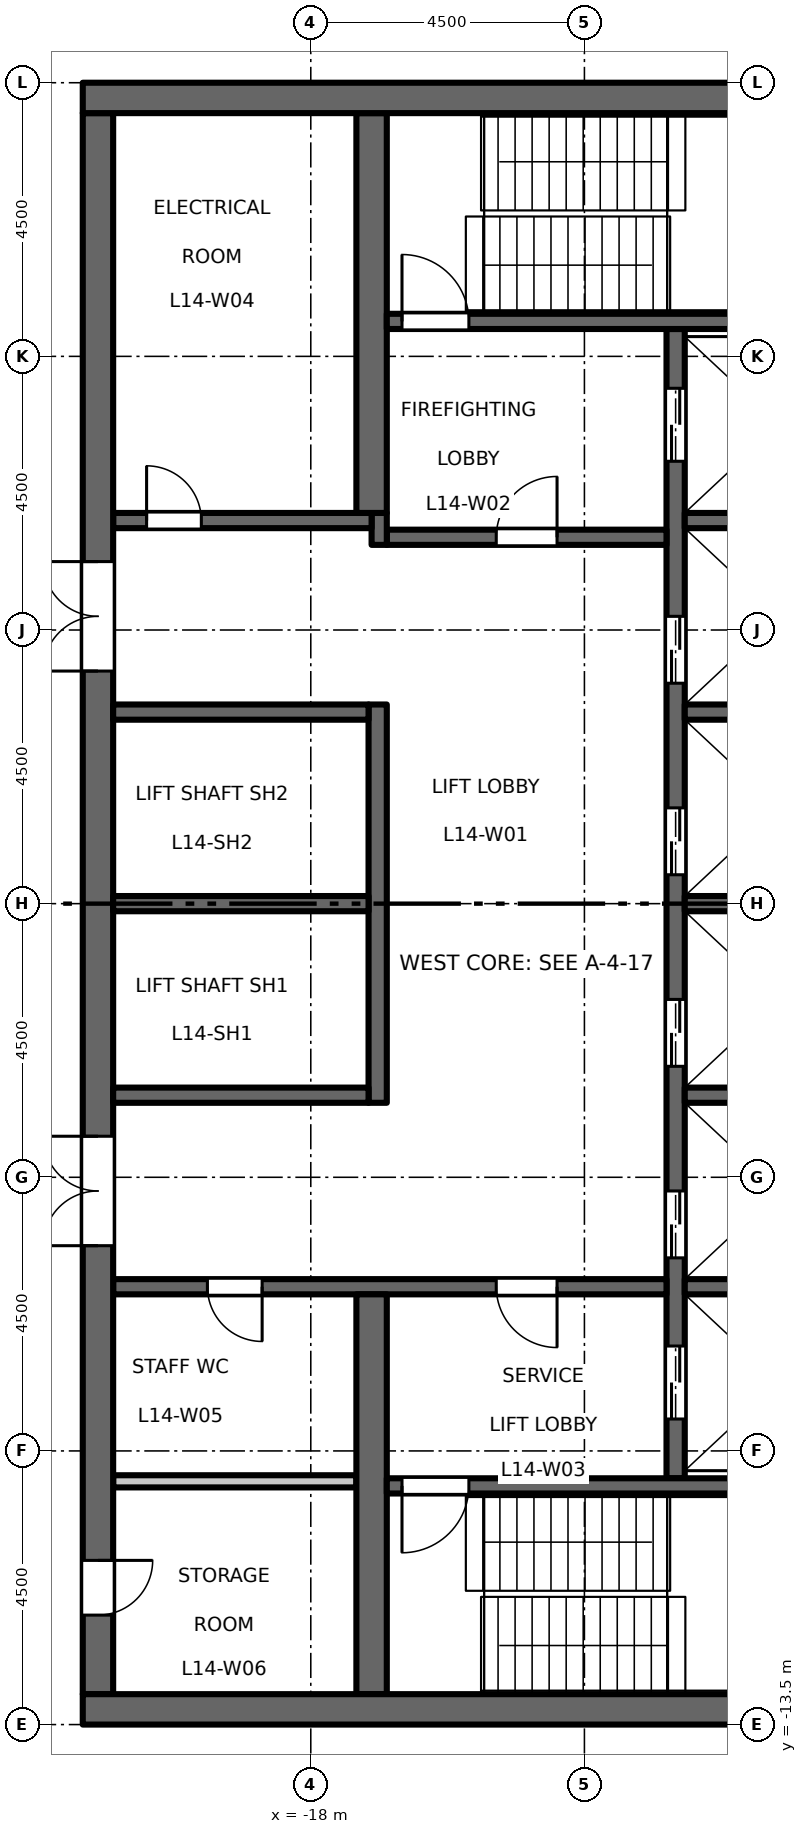
"""IFC4 building model, lengths in metres.
Left out: names, types, materials, properties, quantities, classifications, styles, units other than length and angle.
Written with IfcOpenShell. Run it as: python <this file> out.ifc"""

import sys

from ifc_helpers import new_model, si_unit, direction, frame, frame_2d, origin, place, context, subcontext, project, spatial, rectangle, extrude, element, fill, save


model = new_model("IFC4")
c1 = context("Model", 3, precision=1e-05, world=origin(), true_north=direction((0.0, 1.0)))
c2 = subcontext(c1, "Body", "Model", "MODEL_VIEW")
j1 = project(units=[si_unit("LENGTHUNIT", "METRE"), si_unit("PLANEANGLEUNIT", "RADIAN")], contexts=[c1])
p1 = place(None, origin())
s1 = spatial("IfcSite", under=j1, at=p1, CompositionType="ELEMENT")
p2 = place(p1, origin())
s2 = spatial("IfcBuilding", under=s1, at=p2, CompositionType="ELEMENT")
p3 = place(p2, frame((0.0, 0.0, 67.2)))
s3 = spatial("IfcBuildingStorey", under=s2, at=p3, CompositionType="ELEMENT", Elevation=67.2)
p4 = place(p3, frame((-12.0, -9.45, 0.0), z_axis=(0.0, 0.0, 1.0), x_axis=(0.0, 1.0, 0.0)))
e1 = element("IfcWall", 1, at=p4, inside=s3, PredefinedType="SHEAR", context=c2, shape_type="SweptSolid", body=[
    extrude(rectangle(XDim=18.9, YDim=0.3, at=frame_2d((9.45, 0.0))), origin(), (0.0, 0.0, 1.0), 4.35),
])
p5 = place(p4, frame((3.625, 0.0, 0.0)))
e2 = element("IfcOpeningElement", 2, at=p5, cuts=e1, PredefinedType="OPENING", context=c2, shape_type="SweptSolid", body=[
    extrude(rectangle(XDim=1.1, YDim=2.1, at=frame_2d((0.55, 1.05))), frame((0.0, 0.16, 0.0), z_axis=(0.0, -1.0, 0.0), x_axis=(1.0, 0.0, 0.0)), (0.0, 0.0, 1.0), 0.32),
])
p6 = place(p4, frame((6.775, 0.0, 0.0)))
e3 = element("IfcOpeningElement", 3, at=p6, cuts=e1, PredefinedType="OPENING", context=c2, shape_type="SweptSolid", body=[
    extrude(rectangle(XDim=1.1, YDim=2.1, at=frame_2d((0.55, 1.05))), frame((0.0, 0.16, 0.0), z_axis=(0.0, -1.0, 0.0), x_axis=(1.0, 0.0, 0.0)), (0.0, 0.0, 1.0), 0.32),
])
p7 = place(p4, frame((9.925, 0.0, 0.0)))
e4 = element("IfcOpeningElement", 4, at=p7, cuts=e1, PredefinedType="OPENING", context=c2, shape_type="SweptSolid", body=[
    extrude(rectangle(XDim=1.1, YDim=2.1, at=frame_2d((0.55, 1.05))), frame((0.0, 0.16, 0.0), z_axis=(0.0, -1.0, 0.0), x_axis=(1.0, 0.0, 0.0)), (0.0, 0.0, 1.0), 0.32),
])
p8 = place(p4, frame((13.075, 0.0, 0.0)))
e5 = element("IfcOpeningElement", 5, at=p8, cuts=e1, PredefinedType="OPENING", context=c2, shape_type="SweptSolid", body=[
    extrude(rectangle(XDim=1.1, YDim=2.1, at=frame_2d((0.55, 1.05))), frame((0.0, 0.16, 0.0), z_axis=(0.0, -1.0, 0.0), x_axis=(1.0, 0.0, 0.0)), (0.0, 0.0, 1.0), 0.32),
])
p9 = place(p4, frame((16.725, 0.0, 0.0)))
e6 = element("IfcOpeningElement", 6, at=p9, cuts=e1, PredefinedType="OPENING", context=c2, shape_type="SweptSolid", body=[
    extrude(rectangle(XDim=1.2, YDim=2.1, at=frame_2d((0.6, 1.05))), frame((0.0, 0.16, 0.0), z_axis=(0.0, -1.0, 0.0), x_axis=(1.0, 0.0, 0.0)), (0.0, 0.0, 1.0), 0.32),
])
p10 = place(p4, frame((0.975, 0.0, 0.0)))
e7 = element("IfcOpeningElement", 7, at=p10, cuts=e1, PredefinedType="OPENING", context=c2, shape_type="SweptSolid", body=[
    extrude(rectangle(XDim=1.2, YDim=2.1, at=frame_2d((0.6, 1.05))), frame((0.0, 0.16, 0.0), z_axis=(0.0, -1.0, 0.0), x_axis=(1.0, 0.0, 0.0)), (0.0, 0.0, 1.0), 0.32),
])
p11 = place(p3, frame((-12.15, 6.025, 0.0), z_axis=(0.0, 0.0, 1.0), x_axis=(-1.0, 0.0, 0.0)))
e8 = element("IfcWall", 8, at=p11, inside=s3, PredefinedType="SHEAR", context=c2, shape_type="SweptSolid", body=[
    extrude(rectangle(XDim=4.6, YDim=0.25, at=frame_2d((2.3, 0.0))), origin(), (0.0, 0.0, 1.0), 4.35),
])
p12 = place(p11, frame((1.8, 0.0, 0.0)))
e9 = element("IfcOpeningElement", 9, at=p12, cuts=e8, PredefinedType="OPENING", context=c2, shape_type="SweptSolid", body=[
    extrude(rectangle(XDim=1.0, YDim=2.1, at=frame_2d((0.5, 1.05))), frame((0.0, 0.135, 0.0), z_axis=(0.0, -1.0, 0.0), x_axis=(1.0, 0.0, 0.0)), (0.0, 0.0, 1.0), 0.27),
])
p13 = place(p3, frame((-16.875, 5.9, 0.0), z_axis=(0.0, 0.0, 1.0), x_axis=(0.0, 1.0, 0.0)))
e10 = element("IfcWall", 10, at=p13, inside=s3, PredefinedType="SHEAR", context=c2, shape_type="SweptSolid", body=[
    extrude(rectangle(XDim=0.525, YDim=0.25, at=frame_2d((0.263, 0.0))), origin(), (0.0, 0.0, 1.0), 4.35),
])
p14 = place(p3, frame((-17.0, 6.3, 0.0), z_axis=(0.0, 0.0, 1.0), x_axis=(-1.0, 0.0, 0.0)))
e11 = element("IfcWall", 11, at=p14, inside=s3, PredefinedType="SHEAR", context=c2, shape_type="SweptSolid", body=[
    extrude(rectangle(XDim=4.25, YDim=0.25, at=frame_2d((2.125, 0.0))), origin(), (0.0, 0.0, 1.0), 4.35),
])
p15 = place(p14, frame((2.8, 0.0, 0.0)))
e12 = element("IfcOpeningElement", 12, at=p15, cuts=e11, PredefinedType="OPENING", context=c2, shape_type="SweptSolid", body=[
    extrude(rectangle(XDim=0.9, YDim=2.1, at=frame_2d((0.45, 1.05))), frame((0.0, 0.135, 0.0), z_axis=(0.0, -1.0, 0.0), x_axis=(1.0, 0.0, 0.0)), (0.0, 0.0, 1.0), 0.27),
])
p16 = place(p3, frame((-12.15, -6.3, 0.0), z_axis=(0.0, 0.0, 1.0), x_axis=(-1.0, 0.0, 0.0)))
e13 = element("IfcWall", 13, at=p16, inside=s3, PredefinedType="SHEAR", context=c2, shape_type="SweptSolid", body=[
    extrude(rectangle(XDim=9.1, YDim=0.25, at=frame_2d((4.55, 0.0))), origin(), (0.0, 0.0, 1.0), 4.35),
])
p17 = place(p16, frame((1.8, 0.0, 0.0)))
e14 = element("IfcOpeningElement", 14, at=p17, cuts=e13, PredefinedType="OPENING", context=c2, shape_type="SweptSolid", body=[
    extrude(rectangle(XDim=1.0, YDim=2.1, at=frame_2d((0.5, 1.05))), frame((0.0, 0.135, 0.0), z_axis=(0.0, -1.0, 0.0), x_axis=(1.0, 0.0, 0.0)), (0.0, 0.0, 1.0), 0.27),
])
p18 = place(p16, frame((6.65, 0.0, 0.0)))
e15 = element("IfcOpeningElement", 15, at=p18, cuts=e13, PredefinedType="OPENING", context=c2, shape_type="SweptSolid", body=[
    extrude(rectangle(XDim=0.9, YDim=2.1, at=frame_2d((0.45, 1.05))), frame((0.0, 0.135, 0.0), z_axis=(0.0, -1.0, 0.0), x_axis=(1.0, 0.0, 0.0)), (0.0, 0.0, 1.0), 0.27),
])
p19 = place(p3, frame((-21.5, -13.0, 0.0), z_axis=(0.0, 0.0, 1.0), x_axis=(0.0, 1.0, 0.0)))
e16 = element("IfcWall", 16, at=p19, inside=s3, PredefinedType="SHEAR", context=c2, shape_type="SweptSolid", body=[
    extrude(rectangle(XDim=26.0, YDim=0.5, at=frame_2d((13.0, 0.0))), origin(), (0.0, 0.0, 1.0), 4.35),
])
p20 = place(p19, frame((16.825, 0.0, 0.0)))
e17 = element("IfcOpeningElement", 17, at=p20, cuts=e16, PredefinedType="OPENING", context=c2, shape_type="SweptSolid", body=[
    extrude(rectangle(XDim=1.8, YDim=2.1, at=frame_2d((0.9, 1.05))), frame((0.0, 0.26, 0.0), z_axis=(0.0, -1.0, 0.0), x_axis=(1.0, 0.0, 0.0)), (0.0, 0.0, 1.0), 0.52),
])
p21 = place(p19, frame((7.375, 0.0, 0.0)))
e18 = element("IfcOpeningElement", 18, at=p21, cuts=e16, PredefinedType="OPENING", context=c2, shape_type="SweptSolid", body=[
    extrude(rectangle(XDim=1.8, YDim=2.1, at=frame_2d((0.9, 1.05))), frame((0.0, 0.26, 0.0), z_axis=(0.0, -1.0, 0.0), x_axis=(1.0, 0.0, 0.0)), (0.0, 0.0, 1.0), 0.52),
])
p22 = place(p19, frame((1.3, 0.0, 0.0)))
e19 = element("IfcOpeningElement", 19, at=p22, cuts=e16, PredefinedType="OPENING", context=c2, shape_type="SweptSolid", body=[
    extrude(rectangle(XDim=0.9, YDim=2.1, at=frame_2d((0.45, 1.05))), frame((0.0, 0.26, 0.0), z_axis=(0.0, -1.0, 0.0), x_axis=(1.0, 0.0, 0.0)), (0.0, 0.0, 1.0), 0.52),
])
p23 = place(p3, frame((-17.25, -9.5, 0.0), z_axis=(0.0, 0.0, 1.0), x_axis=(-1.0, 0.0, 0.0)))
e20 = element("IfcWall", 20, at=p23, inside=s3, PredefinedType="PARTITIONING", context=c2, shape_type="SweptSolid", body=[
    extrude(rectangle(XDim=4.0, YDim=0.2, at=frame_2d((2.0, 0.0))), origin(), (0.0, 0.0, 1.0), 4.35),
])
p24 = place(p3, frame((-16.9, -3.275, 0.0), z_axis=(0.0, 0.0, 1.0), x_axis=(0.0, 1.0, 0.0)))
e21 = element("IfcWall", 21, at=p24, inside=s3, PredefinedType="SHEAR", context=c2, shape_type="SweptSolid", body=[
    extrude(rectangle(XDim=6.55, YDim=0.3, at=frame_2d((3.275, 0.0))), origin(), (0.0, 0.0, 1.0), 4.35),
])
for number, where, z_axis, x_axis in (
    (22, (-17.05, 0.0, 0.0), (0.0, 0.0, 1.0), (-1.0, 0.0, 0.0)),
    (23, (-17.05, 3.15, 0.0), (0.0, 0.0, 1.0), (-1.0, 0.0, 0.0)),
    (24, (-17.05, -3.15, 0.0), (0.0, 0.0, 1.0), (-1.0, 0.0, 0.0)),
):
    element("IfcWall", number, at=place(p3, frame(where, z_axis=z_axis, x_axis=x_axis)), inside=s3, PredefinedType="SHEAR", context=c2, shape_type="SweptSolid", body=[
        extrude(rectangle(XDim=4.2, YDim=0.25, at=frame_2d((2.1, 0.0))), origin(), (0.0, 0.0, 1.0), 4.35),
    ])
for number, where, z_axis, x_axis in (
    (25, (-17.0, 6.425, 0.0), (0.0, 0.0, 1.0), (0.0, 1.0, 0.0)),
    (26, (-17.0, -13.0, 0.0), (0.0, 0.0, 1.0), (0.0, 1.0, 0.0)),
):
    element("IfcWall", number, at=place(p3, frame(where, z_axis=z_axis, x_axis=x_axis)), inside=s3, PredefinedType="SHEAR", context=c2, shape_type="SweptSolid", body=[
        extrude(rectangle(XDim=6.575, YDim=0.5, at=frame_2d((3.288, 0.0))), origin(), (0.0, 0.0, 1.0), 4.35),
    ])
for number, where, z_axis, x_axis in (
    (27, (-8.75, 0.0, 0.0), (0.0, 0.0, 1.0), (-1.0, 0.0, 0.0)),
    (28, (-8.75, 3.15, 0.0), (0.0, 0.0, 1.0), (-1.0, 0.0, 0.0)),
    (29, (-8.75, 6.3, 0.0), (0.0, 0.0, 1.0), (-1.0, 0.0, 0.0)),
    (30, (-8.75, -3.15, 0.0), (0.0, 0.0, 1.0), (-1.0, 0.0, 0.0)),
    (31, (-8.75, -6.3, 0.0), (0.0, 0.0, 1.0), (-1.0, 0.0, 0.0)),
):
    element("IfcWall", number, at=place(p3, frame(where, z_axis=z_axis, x_axis=x_axis)), inside=s3, PredefinedType="SHEAR", context=c2, shape_type="SweptSolid", body=[
        extrude(rectangle(XDim=3.1, YDim=0.25, at=frame_2d((1.55, 0.0))), origin(), (0.0, 0.0, 1.0), 4.35),
    ])
p25 = place(p3, frame((-8.75, 9.575, 0.0), z_axis=(0.0, 0.0, 1.0), x_axis=(-1.0, 0.0, 0.0)))
e32 = element("IfcWall", 32, at=p25, inside=s3, PredefinedType="SHEAR", context=c2, shape_type="SweptSolid", body=[
    extrude(rectangle(XDim=8.0, YDim=0.25, at=frame_2d((4.0, 0.0))), origin(), (0.0, 0.0, 1.0), 4.35),
])
p26 = place(p25, frame((6.65, 0.0, 0.0)))
e33 = element("IfcOpeningElement", 33, at=p26, cuts=e32, PredefinedType="OPENING", context=c2, shape_type="SweptSolid", body=[
    extrude(rectangle(XDim=1.1, YDim=2.1, at=frame_2d((0.55, 1.05))), frame((0.0, 0.135, 0.0), z_axis=(0.0, -1.0, 0.0), x_axis=(1.0, 0.0, 0.0)), (0.0, 0.0, 1.0), 0.27),
])
p27 = place(p3, frame((-8.75, -9.575, 0.0), z_axis=(0.0, 0.0, 1.0), x_axis=(-1.0, 0.0, 0.0)))
e34 = element("IfcWall", 34, at=p27, inside=s3, PredefinedType="SHEAR", context=c2, shape_type="SweptSolid", body=[
    extrude(rectangle(XDim=8.0, YDim=0.25, at=frame_2d((4.0, 0.0))), origin(), (0.0, 0.0, 1.0), 4.35),
])
p28 = place(p27, frame((6.65, 0.0, 0.0)))
e35 = element("IfcOpeningElement", 35, at=p28, cuts=e34, PredefinedType="OPENING", context=c2, shape_type="SweptSolid", body=[
    extrude(rectangle(XDim=1.1, YDim=2.1, at=frame_2d((0.55, 1.05))), frame((0.0, 0.135, 0.0), z_axis=(0.0, -1.0, 0.0), x_axis=(1.0, 0.0, 0.0)), (0.0, 0.0, 1.0), 0.27),
])
for number, where, z_axis, x_axis in (
    (36, (-8.25, 13.25, 0.0), (0.0, 0.0, 1.0), (-1.0, 0.0, 0.0)),
    (37, (-8.25, -13.25, 0.0), (0.0, 0.0, 1.0), (-1.0, 0.0, 0.0)),
):
    element("IfcWall", number, at=place(p3, frame(where, z_axis=z_axis, x_axis=x_axis)), inside=s3, PredefinedType="SHEAR", context=c2, shape_type="SweptSolid", body=[
        extrude(rectangle(XDim=13.5, YDim=0.5, at=frame_2d((6.75, 0.0))), origin(), (0.0, 0.0, 1.0), 4.35),
    ])
p29 = place(p12, origin())
e38 = element("IfcDoor", 38, at=p29, inside=s3, OperationType="SINGLE_SWING_LEFT", PredefinedType="DOOR", context=c2, shape_type="SweptSolid", body=[
    extrude(rectangle(XDim=1.0, YDim=2.1, at=frame_2d((0.5, 1.05))), frame((0.0, 0.025, 0.0), z_axis=(0.0, -1.0, 0.0), x_axis=(1.0, 0.0, 0.0)), (0.0, 0.0, 1.0), 0.05),
])
fill(e9, e38)
p30 = place(p17, origin())
e39 = element("IfcDoor", 39, at=p30, inside=s3, OperationType="SINGLE_SWING_RIGHT", PredefinedType="DOOR", context=c2, shape_type="SweptSolid", body=[
    extrude(rectangle(XDim=1.0, YDim=2.1, at=frame_2d((0.5, 1.05))), frame((0.0, 0.025, 0.0), z_axis=(0.0, -1.0, 0.0), x_axis=(1.0, 0.0, 0.0)), (0.0, 0.0, 1.0), 0.05),
])
fill(e14, e39)
p31 = place(p26, origin())
e40 = element("IfcDoor", 40, at=p31, inside=s3, OperationType="SINGLE_SWING_RIGHT", PredefinedType="DOOR", context=c2, shape_type="SweptSolid", body=[
    extrude(rectangle(XDim=1.1, YDim=2.1, at=frame_2d((0.55, 1.05))), frame((0.0, 0.025, 0.0), z_axis=(0.0, -1.0, 0.0), x_axis=(1.0, 0.0, 0.0)), (0.0, 0.0, 1.0), 0.05),
])
fill(e33, e40)
p32 = place(p28, origin())
e41 = element("IfcDoor", 41, at=p32, inside=s3, OperationType="SINGLE_SWING_LEFT", PredefinedType="DOOR", context=c2, shape_type="SweptSolid", body=[
    extrude(rectangle(XDim=1.1, YDim=2.1, at=frame_2d((0.55, 1.05))), frame((0.0, 0.025, 0.0), z_axis=(0.0, -1.0, 0.0), x_axis=(1.0, 0.0, 0.0)), (0.0, 0.0, 1.0), 0.05),
])
fill(e35, e41)
p33 = place(p20, origin())
e42 = element("IfcDoor", 42, at=p33, inside=s3, OperationType="DOUBLE_DOOR_DOUBLE_SWING", PredefinedType="DOOR", context=c2, shape_type="SweptSolid", body=[
    extrude(rectangle(XDim=1.8, YDim=2.1, at=frame_2d((0.9, 1.05))), frame((0.0, 0.025, 0.0), z_axis=(0.0, -1.0, 0.0), x_axis=(1.0, 0.0, 0.0)), (0.0, 0.0, 1.0), 0.05),
])
fill(e17, e42)
p34 = place(p21, origin())
e43 = element("IfcDoor", 43, at=p34, inside=s3, OperationType="DOUBLE_DOOR_DOUBLE_SWING", PredefinedType="DOOR", context=c2, shape_type="SweptSolid", body=[
    extrude(rectangle(XDim=1.8, YDim=2.1, at=frame_2d((0.9, 1.05))), frame((0.0, 0.025, 0.0), z_axis=(0.0, -1.0, 0.0), x_axis=(1.0, 0.0, 0.0)), (0.0, 0.0, 1.0), 0.05),
])
fill(e18, e43)
p35 = place(p5, origin())
e44 = element("IfcDoor", 44, at=p35, inside=s3, OperationType="DOUBLE_DOOR_SLIDING", PredefinedType="DOOR", context=c2, shape_type="SweptSolid", body=[
    extrude(rectangle(XDim=1.1, YDim=2.1, at=frame_2d((0.55, 1.05))), frame((0.0, 0.025, 0.0), z_axis=(0.0, -1.0, 0.0), x_axis=(1.0, 0.0, 0.0)), (0.0, 0.0, 1.0), 0.05),
])
fill(e2, e44)
p36 = place(p6, origin())
e45 = element("IfcDoor", 45, at=p36, inside=s3, OperationType="DOUBLE_DOOR_SLIDING", PredefinedType="DOOR", context=c2, shape_type="SweptSolid", body=[
    extrude(rectangle(XDim=1.1, YDim=2.1, at=frame_2d((0.55, 1.05))), frame((0.0, 0.025, 0.0), z_axis=(0.0, -1.0, 0.0), x_axis=(1.0, 0.0, 0.0)), (0.0, 0.0, 1.0), 0.05),
])
fill(e3, e45)
p37 = place(p7, origin())
e46 = element("IfcDoor", 46, at=p37, inside=s3, OperationType="DOUBLE_DOOR_SLIDING", PredefinedType="DOOR", context=c2, shape_type="SweptSolid", body=[
    extrude(rectangle(XDim=1.1, YDim=2.1, at=frame_2d((0.55, 1.05))), frame((0.0, 0.025, 0.0), z_axis=(0.0, -1.0, 0.0), x_axis=(1.0, 0.0, 0.0)), (0.0, 0.0, 1.0), 0.05),
])
fill(e4, e46)
p38 = place(p8, origin())
e47 = element("IfcDoor", 47, at=p38, inside=s3, OperationType="DOUBLE_DOOR_SLIDING", PredefinedType="DOOR", context=c2, shape_type="SweptSolid", body=[
    extrude(rectangle(XDim=1.1, YDim=2.1, at=frame_2d((0.55, 1.05))), frame((0.0, 0.025, 0.0), z_axis=(0.0, -1.0, 0.0), x_axis=(1.0, 0.0, 0.0)), (0.0, 0.0, 1.0), 0.05),
])
fill(e5, e47)
p39 = place(p9, origin())
e48 = element("IfcDoor", 48, at=p39, inside=s3, OperationType="DOUBLE_DOOR_SLIDING", PredefinedType="DOOR", context=c2, shape_type="SweptSolid", body=[
    extrude(rectangle(XDim=1.2, YDim=2.1, at=frame_2d((0.6, 1.05))), frame((0.0, 0.025, 0.0), z_axis=(0.0, -1.0, 0.0), x_axis=(1.0, 0.0, 0.0)), (0.0, 0.0, 1.0), 0.05),
])
fill(e6, e48)
p40 = place(p10, origin())
e49 = element("IfcDoor", 49, at=p40, inside=s3, OperationType="DOUBLE_DOOR_SLIDING", PredefinedType="DOOR", context=c2, shape_type="SweptSolid", body=[
    extrude(rectangle(XDim=1.2, YDim=2.1, at=frame_2d((0.6, 1.05))), frame((0.0, 0.025, 0.0), z_axis=(0.0, -1.0, 0.0), x_axis=(1.0, 0.0, 0.0)), (0.0, 0.0, 1.0), 0.05),
])
fill(e7, e49)
p41 = place(p15, origin())
e50 = element("IfcDoor", 50, at=p41, inside=s3, OperationType="SINGLE_SWING_RIGHT", PredefinedType="DOOR", context=c2, shape_type="SweptSolid", body=[
    extrude(rectangle(XDim=0.9, YDim=2.1, at=frame_2d((0.45, 1.05))), frame((0.0, 0.025, 0.0), z_axis=(0.0, -1.0, 0.0), x_axis=(1.0, 0.0, 0.0)), (0.0, 0.0, 1.0), 0.05),
])
fill(e12, e50)
p42 = place(p18, origin())
e51 = element("IfcDoor", 51, at=p42, inside=s3, OperationType="SINGLE_SWING_RIGHT", PredefinedType="DOOR", context=c2, shape_type="SweptSolid", body=[
    extrude(rectangle(XDim=0.9, YDim=2.1, at=frame_2d((0.45, 1.05))), frame((0.0, 0.025, 0.0), z_axis=(0.0, -1.0, 0.0), x_axis=(1.0, 0.0, 0.0)), (0.0, 0.0, 1.0), 0.05),
])
fill(e15, e51)
p43 = place(p22, origin())
e52 = element("IfcDoor", 52, at=p43, inside=s3, OperationType="SINGLE_SWING_RIGHT", PredefinedType="DOOR", context=c2, shape_type="SweptSolid", body=[
    extrude(rectangle(XDim=0.9, YDim=2.1, at=frame_2d((0.45, 1.05))), frame((0.0, 0.025, 0.0), z_axis=(0.0, -1.0, 0.0), x_axis=(1.0, 0.0, 0.0)), (0.0, 0.0, 1.0), 0.05),
])
fill(e19, e52)
save(model, sys.argv[1])
